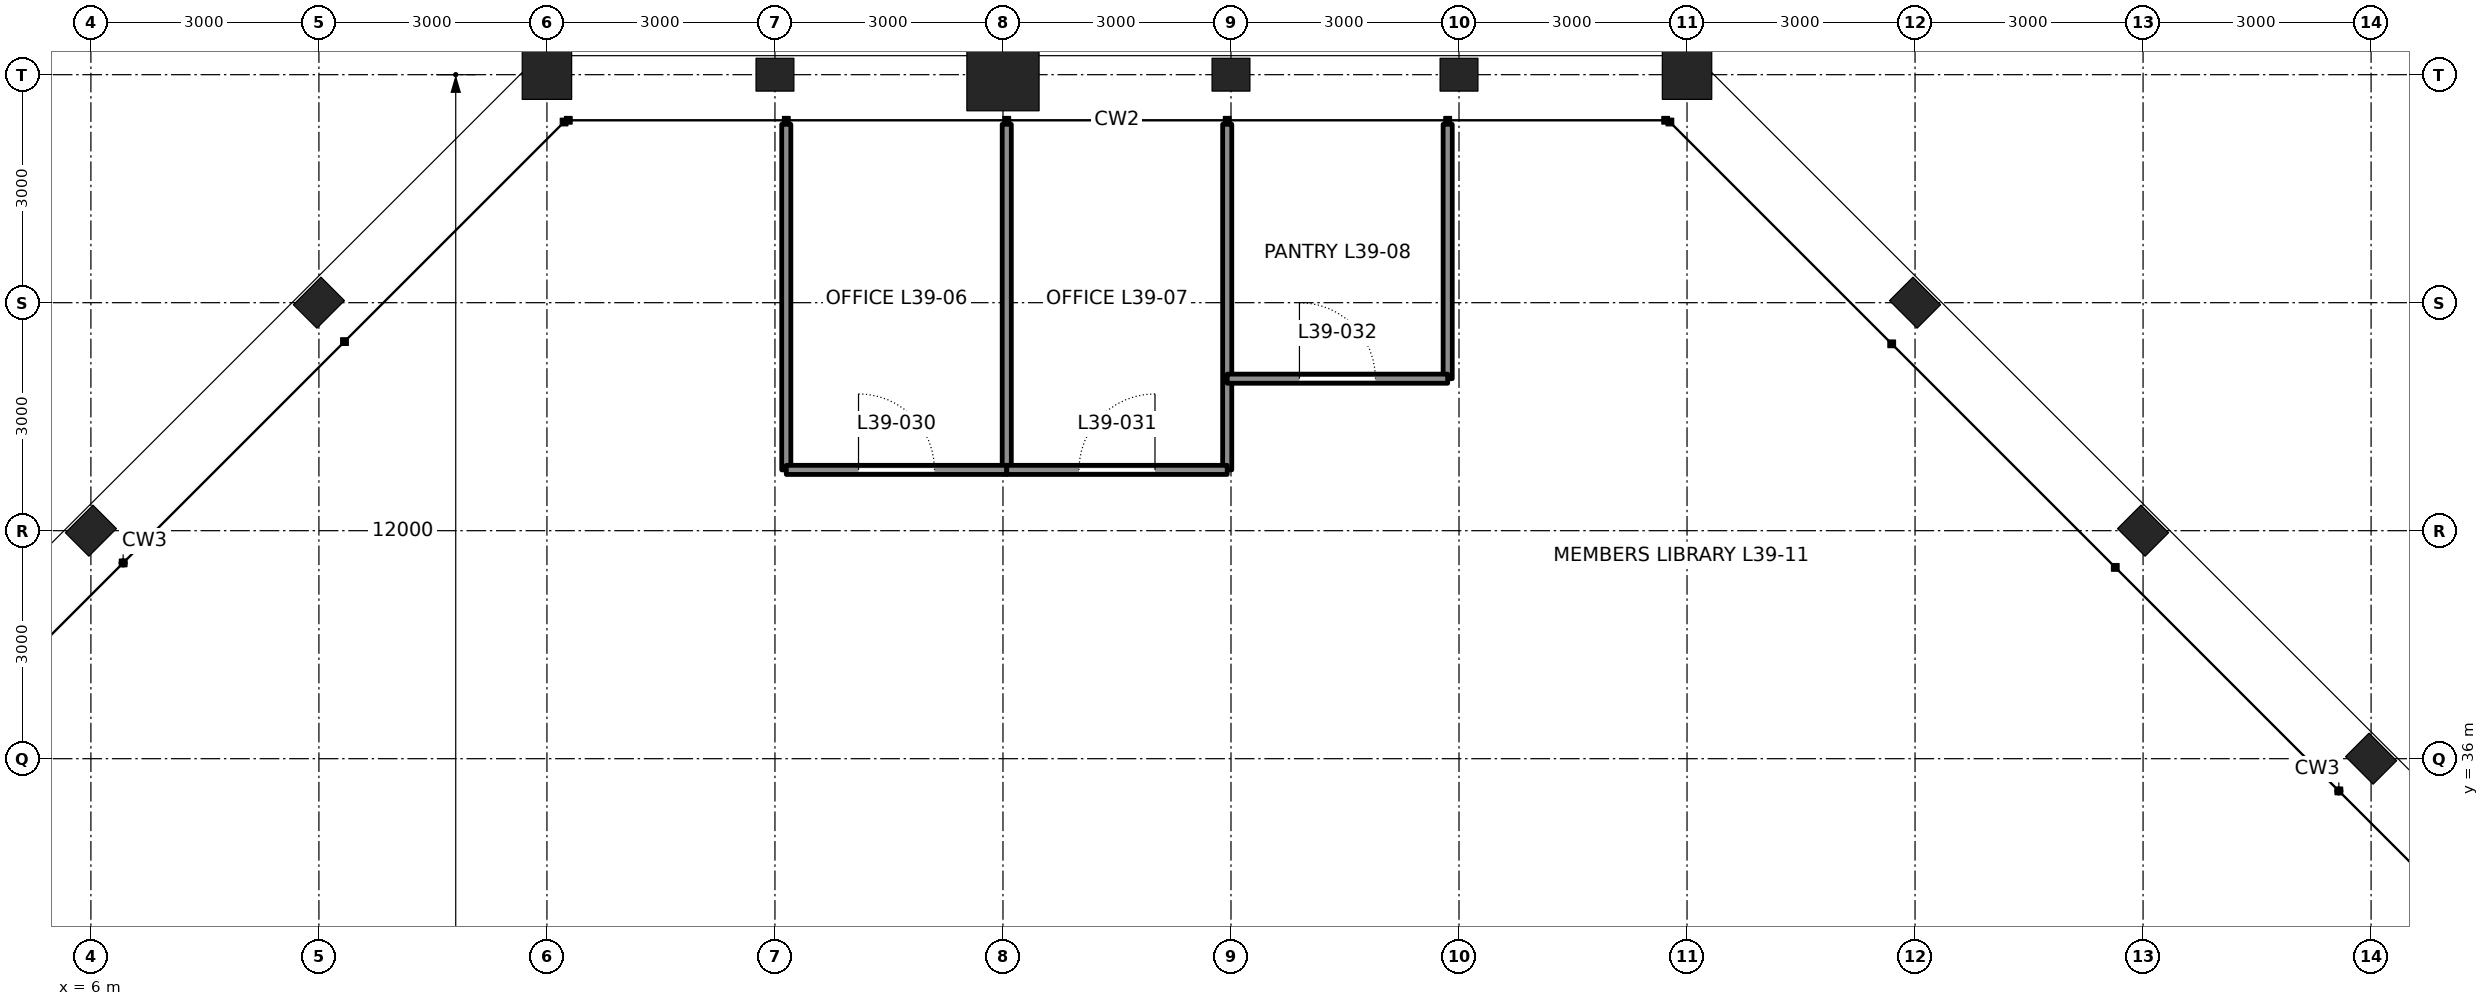
"""IFC4 building model, lengths in metres.
Left out: names, types, materials, properties, quantities, classifications, styles, units other than length and angle.
Written with IfcOpenShell. Run it as: python <this file> out.ifc"""

import sys

from ifc_helpers import new_model, si_unit, direction, frame, frame_2d, origin, origin_2d, place, context, subcontext, project, spatial, rectangle, hollow_rectangle, i_section, extrude, element, fill, save


model = new_model("IFC4")
c1 = context("Model", 3, precision=1e-05, world=origin(), true_north=direction((0.0, 1.0)))
c2 = subcontext(c1, "Body", "Model", "MODEL_VIEW")
j1 = project(units=[si_unit("LENGTHUNIT", "METRE"), si_unit("PLANEANGLEUNIT", "RADIAN")], contexts=[c1])
p1 = place(None, origin())
s1 = spatial("IfcSite", under=j1, at=p1, CompositionType="ELEMENT")
p2 = place(p1, origin())
s2 = spatial("IfcBuilding", under=s1, at=p2, CompositionType="ELEMENT")
p3 = place(p2, frame((0.0, 0.0, 180.0)))
s3 = spatial("IfcBuildingStorey", under=s2, at=p3, CompositionType="ELEMENT", Elevation=180.0)
for number, where, z_axis, x_axis in (
    (1, (36.0, 36.0, 0.0), (0.0, 0.0, 1.0), (0.707, 0.707, 0.0)),
    (2, (33.0, 39.0, 0.0), (0.0, 0.0, 1.0), (0.707, 0.707, 0.0)),
    (3, (30.0, 42.0, 0.0), (0.0, 0.0, 1.0), (0.707, 0.707, 0.0)),
):
    element("IfcColumn", number, at=place(p3, frame(where, z_axis=z_axis, x_axis=x_axis)), inside=s3, PredefinedType="COLUMN", context=c2, shape_type="SweptSolid", body=[
        extrude(i_section(OverallWidth=0.437, OverallDepth=0.513, WebThickness=0.061, FlangeThickness=0.097, at=origin_2d()), origin(), (0.0, 0.0, 1.0), 4.5),
    ])
p4 = place(p3, frame((27.0, 45.0, 0.0), z_axis=(0.0, 0.0, 1.0), x_axis=(0.0, 1.0, 0.0)))
e4 = element("IfcColumn", 4, at=p4, inside=s3, PredefinedType="COLUMN", context=c2, shape_type="SweptSolid", body=[
    extrude(hollow_rectangle(XDim=0.65, YDim=0.65, WallThickness=0.065, at=origin_2d()), origin(), (0.0, 0.0, 1.0), 4.5),
])
for number, where, z_axis, x_axis in (
    (5, (24.0, 45.0, 0.0), (0.0, 0.0, 1.0), (0.0, 1.0, 0.0)),
    (6, (21.0, 45.0, 0.0), (0.0, 0.0, 1.0), (0.0, 1.0, 0.0)),
):
    element("IfcColumn", number, at=place(p3, frame(where, z_axis=z_axis, x_axis=x_axis)), inside=s3, PredefinedType="COLUMN", context=c2, shape_type="SweptSolid", body=[
        extrude(i_section(OverallWidth=0.432, OverallDepth=0.498, WebThickness=0.056, FlangeThickness=0.089, at=origin_2d()), origin(), (0.0, 0.0, 1.0), 4.5),
    ])
p5 = place(p3, frame((18.0, 45.0, 0.0), z_axis=(0.0, 0.0, 1.0), x_axis=(0.0, 1.0, 0.0)))
e7 = element("IfcColumn", 7, at=p5, inside=s3, PredefinedType="COLUMN", context=c2, shape_type="SweptSolid", body=[
    extrude(hollow_rectangle(XDim=0.95, YDim=0.95, WallThickness=0.11, at=origin_2d()), origin(), (0.0, 0.0, 1.0), 4.5),
])
p6 = place(p3, frame((15.0, 45.0, 0.0), z_axis=(0.0, 0.0, 1.0), x_axis=(0.0, 1.0, 0.0)))
e8 = element("IfcColumn", 8, at=p6, inside=s3, PredefinedType="COLUMN", context=c2, shape_type="SweptSolid", body=[
    extrude(i_section(OverallWidth=0.432, OverallDepth=0.498, WebThickness=0.056, FlangeThickness=0.089, at=origin_2d()), origin(), (0.0, 0.0, 1.0), 4.5),
])
p7 = place(p3, frame((12.0, 45.0, 0.0), z_axis=(0.0, 0.0, 1.0), x_axis=(0.0, 1.0, 0.0)))
e9 = element("IfcColumn", 9, at=p7, inside=s3, PredefinedType="COLUMN", context=c2, shape_type="SweptSolid", body=[
    extrude(hollow_rectangle(XDim=0.65, YDim=0.65, WallThickness=0.065, at=origin_2d()), origin(), (0.0, 0.0, 1.0), 4.5),
])
for number, where, z_axis, x_axis in (
    (10, (9.0, 42.0, -0.91), (0.0, 0.0, 1.0), (-0.707, 0.707, 0.0)),
    (11, (6.0, 39.0, -0.91), (0.0, 0.0, 1.0), (-0.707, 0.707, 0.0)),
):
    element("IfcColumn", number, at=place(p3, frame(where, z_axis=z_axis, x_axis=x_axis)), inside=s3, PredefinedType="COLUMN", context=c2, shape_type="SweptSolid", body=[
        extrude(i_section(OverallWidth=0.437, OverallDepth=0.513, WebThickness=0.061, FlangeThickness=0.097, at=origin_2d()), origin(), (0.0, 0.0, 1.0), 5.41),
    ])
p8 = place(p3, frame((15.149, 44.347, 0.0), z_axis=(0.0, 0.0, 1.0), x_axis=(0.0, -1.0, 0.0)))
e12 = element("IfcWall", 12, at=p8, inside=s3, PredefinedType="PARTITIONING", context=c2, shape_type="SweptSolid", body=[
    extrude(rectangle(XDim=4.547, YDim=0.12, at=frame_2d((2.274, 0.0))), origin(), (0.0, 0.0, 1.0), 4.34),
])
for number, where, z_axis, x_axis in (
    (13, (18.05, 44.347, 0.0), (0.0, 0.0, 1.0), (0.0, -1.0, 0.0)),
    (14, (20.95, 44.347, 0.0), (0.0, 0.0, 1.0), (0.0, -1.0, 0.0)),
):
    element("IfcWall", number, at=place(p3, frame(where, z_axis=z_axis, x_axis=x_axis)), inside=s3, PredefinedType="PARTITIONING", context=c2, shape_type="SweptSolid", body=[
        extrude(rectangle(XDim=4.547, YDim=0.12, at=frame_2d((2.274, 0.0))), origin(), (0.0, 0.0, 1.0), 3.657),
    ])
p9 = place(p3, frame((23.851, 44.347, 0.0), z_axis=(0.0, 0.0, 1.0), x_axis=(0.0, -1.0, 0.0)))
e15 = element("IfcWall", 15, at=p9, inside=s3, PredefinedType="PARTITIONING", context=c2, shape_type="SweptSolid", body=[
    extrude(rectangle(XDim=3.347, YDim=0.12, at=frame_2d((1.674, 0.0))), origin(), (0.0, 0.0, 1.0), 4.34),
])
p10 = place(p3, frame((15.149, 39.8, 0.0), z_axis=(0.0, 0.0, 1.0), x_axis=(1.0, 0.0, 0.0)))
e16 = element("IfcWall", 16, at=p10, inside=s3, PredefinedType="PARTITIONING", context=c2, shape_type="SweptSolid", body=[
    extrude(rectangle(XDim=2.901, YDim=0.12, at=frame_2d((1.45, 0.0))), origin(), (0.0, 0.0, 1.0), 4.34),
])
p11 = place(p10, frame((0.95, 0.0, 0.0)))
e17 = element("IfcOpeningElement", 17, at=p11, cuts=e16, PredefinedType="OPENING", context=c2, shape_type="SweptSolid", body=[
    extrude(rectangle(XDim=1.0, YDim=2.4, at=frame_2d((0.5, 1.2))), frame((0.0, 0.07, 0.0), z_axis=(0.0, -1.0, 0.0), x_axis=(1.0, 0.0, 0.0)), (0.0, 0.0, 1.0), 0.14),
])
p12 = place(p3, frame((18.05, 39.8, 0.0), z_axis=(0.0, 0.0, 1.0), x_axis=(1.0, 0.0, 0.0)))
e18 = element("IfcWall", 18, at=p12, inside=s3, PredefinedType="PARTITIONING", context=c2, shape_type="SweptSolid", body=[
    extrude(rectangle(XDim=2.9, YDim=0.12, at=frame_2d((1.45, 0.0))), origin(), (0.0, 0.0, 1.0), 4.34),
])
p13 = place(p12, frame((0.95, 0.0, 0.0)))
e19 = element("IfcOpeningElement", 19, at=p13, cuts=e18, PredefinedType="OPENING", context=c2, shape_type="SweptSolid", body=[
    extrude(rectangle(XDim=1.0, YDim=2.4, at=frame_2d((0.5, 1.2))), frame((0.0, 0.07, 0.0), z_axis=(0.0, -1.0, 0.0), x_axis=(1.0, 0.0, 0.0)), (0.0, 0.0, 1.0), 0.14),
])
p14 = place(p3, frame((20.95, 41.0, 0.0), z_axis=(0.0, 0.0, 1.0), x_axis=(1.0, 0.0, 0.0)))
e20 = element("IfcWall", 20, at=p14, inside=s3, PredefinedType="PARTITIONING", context=c2, shape_type="SweptSolid", body=[
    extrude(rectangle(XDim=2.901, YDim=0.12, at=frame_2d((1.45, 0.0))), origin(), (0.0, 0.0, 1.0), 4.34),
])
p15 = place(p14, frame((0.95, 0.0, 0.0)))
e21 = element("IfcOpeningElement", 21, at=p15, cuts=e20, PredefinedType="OPENING", context=c2, shape_type="SweptSolid", body=[
    extrude(rectangle(XDim=1.0, YDim=2.4, at=frame_2d((0.5, 1.2))), frame((0.0, 0.07, 0.0), z_axis=(0.0, -1.0, 0.0), x_axis=(1.0, 0.0, 0.0)), (0.0, 0.0, 1.0), 0.14),
])
p16 = place(p11, origin())
e22 = element("IfcDoor", 22, at=p16, inside=s3, OperationType="SINGLE_SWING_LEFT", PredefinedType="DOOR", context=c2, shape_type="SweptSolid", body=[
    extrude(rectangle(XDim=1.0, YDim=2.4, at=frame_2d((0.5, 1.2))), frame((0.0, 0.025, 0.0), z_axis=(0.0, -1.0, 0.0), x_axis=(1.0, 0.0, 0.0)), (0.0, 0.0, 1.0), 0.05),
])
fill(e17, e22)
p17 = place(p13, origin())
e23 = element("IfcDoor", 23, at=p17, inside=s3, OperationType="SINGLE_SWING_RIGHT", PredefinedType="DOOR", context=c2, shape_type="SweptSolid", body=[
    extrude(rectangle(XDim=1.0, YDim=2.4, at=frame_2d((0.5, 1.2))), frame((0.0, 0.025, 0.0), z_axis=(0.0, -1.0, 0.0), x_axis=(1.0, 0.0, 0.0)), (0.0, 0.0, 1.0), 0.05),
])
fill(e19, e23)
p18 = place(p15, origin())
e24 = element("IfcDoor", 24, at=p18, inside=s3, OperationType="SINGLE_SWING_LEFT", PredefinedType="DOOR", context=c2, shape_type="SweptSolid", body=[
    extrude(rectangle(XDim=1.0, YDim=2.4, at=frame_2d((0.5, 1.2))), frame((0.0, 0.025, 0.0), z_axis=(0.0, -1.0, 0.0), x_axis=(1.0, 0.0, 0.0)), (0.0, 0.0, 1.0), 0.05),
])
fill(e21, e24)
save(model, sys.argv[1])
